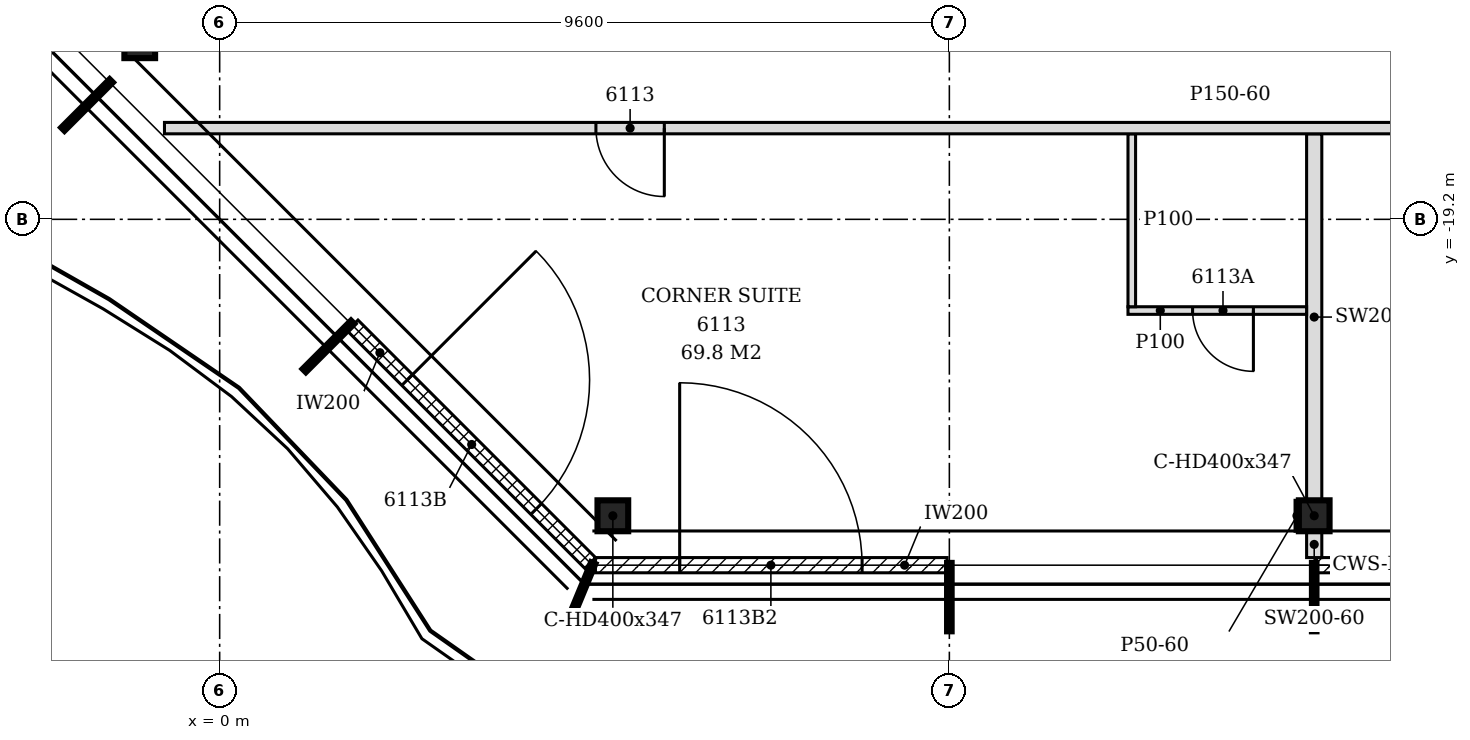
"""IFC4 building model, lengths in metres.
Left out: names, types, materials, properties, quantities, classifications, styles, units other than length and angle.
Written with IfcOpenShell. Run it as: python <this file> out.ifc"""

import sys

from ifc_helpers import new_model, si_unit, direction, frame, frame_2d, origin, origin_2d, place, context, subcontext, project, spatial, polyline, rectangle, i_section, outline, extrude, element, fill, save


model = new_model("IFC4")
c1 = context("Model", 3, precision=1e-05, world=origin(), true_north=direction((0.0, 1.0)))
c2 = subcontext(c1, "Body", "Model", "MODEL_VIEW")
j1 = project(units=[si_unit("LENGTHUNIT", "METRE"), si_unit("PLANEANGLEUNIT", "RADIAN")], contexts=[c1])
p1 = place(None, origin())
s1 = spatial("IfcSite", under=j1, at=p1, CompositionType="ELEMENT")
p2 = place(p1, origin())
s2 = spatial("IfcBuilding", under=s1, at=p2, CompositionType="ELEMENT")
p3 = place(p2, frame((0.0, 0.0, 239.4)))
s3 = spatial("IfcBuildingStorey", under=s2, at=p3, CompositionType="ELEMENT", Elevation=239.4)
for number, where, z_axis, x_axis in (
    (1, (5.173, -23.1, -0.15), (0.0, 0.0, 1.0), (1.0, 0.0, 0.0)),
    (2, (14.4, -23.1, -0.15), (0.0, 0.0, 1.0), (1.0, 0.0, 0.0)),
    (3, (-1.052, -16.876, -0.15), (0.0, 0.0, 1.0), (1.0, 0.0, 0.0)),
):
    element("IfcColumn", number, at=place(p3, frame(where, z_axis=z_axis, x_axis=x_axis)), inside=s3, PredefinedType="COLUMN", context=c2, shape_type="SweptSolid", body=[
        extrude(i_section(OverallWidth=0.404, OverallDepth=0.407, WebThickness=0.027, FlangeThickness=0.044, FilletRadius=0.015, at=origin_2d()), origin(), (0.0, 0.0, 1.0), 3.6),
    ])
p4 = place(p3, frame((4.944, -23.75, 0.0), z_axis=(0.0, 0.0, 1.0), x_axis=(1.0, 0.0, 0.0)))
e4 = element("IfcWall", 4, at=p4, inside=s3, PredefinedType="NOTDEFINED", context=c2, shape_type="SweptSolid", body=[
    extrude(rectangle(XDim=4.626, YDim=0.2, at=frame_2d((2.313, 0.0))), origin(), (0.0, 0.0, 1.0), 3.45),
])
p5 = place(p4, frame((1.108, 0.0, 0.0)))
e5 = element("IfcOpeningElement", 5, at=p5, cuts=e4, PredefinedType="OPENING", context=c2, shape_type="SweptSolid", body=[
    extrude(rectangle(XDim=2.4, YDim=2.4, at=frame_2d((1.2, 1.2))), frame((0.0, 0.11, 0.0), z_axis=(0.0, -1.0, 0.0), x_axis=(1.0, 0.0, 0.0)), (0.0, 0.0, 1.0), 0.22),
])
p6 = place(p3, frame((14.43, -23.75, 0.0), z_axis=(0.0, 0.0, 1.0), x_axis=(1.0, 0.0, 0.0)))
e6 = element("IfcWall", 6, at=p6, inside=s3, PredefinedType="NOTDEFINED", context=c2, shape_type="SweptSolid", body=[
    extrude(rectangle(XDim=4.74, YDim=0.2, at=frame_2d((2.37, 0.0))), origin(), (0.0, 0.0, 1.0), 3.45),
])
p7 = place(p6, frame((1.17, 0.0, 0.0)))
e7 = element("IfcOpeningElement", 7, at=p7, cuts=e6, PredefinedType="OPENING", context=c2, shape_type="SweptSolid", body=[
    extrude(rectangle(XDim=2.4, YDim=2.4, at=frame_2d((1.2, 1.2))), frame((0.0, 0.11, 0.0), z_axis=(0.0, -1.0, 0.0), x_axis=(1.0, 0.0, 0.0)), (0.0, 0.0, 1.0), 0.22),
])
p8 = place(p3, frame((1.749, -20.596, 0.0), z_axis=(0.0, 0.0, 1.0), x_axis=(0.707106781187, -0.707106781187, 0.0)))
e8 = element("IfcWall", 8, at=p8, inside=s3, PredefinedType="NOTDEFINED", context=c2, shape_type="SweptSolid", body=[
    extrude(rectangle(XDim=4.421, YDim=0.2, at=frame_2d((2.21, 0.0))), origin(), (0.0, 0.0, 1.0), 3.45),
])
p9 = place(p8, frame((1.015, 0.0, 0.0)))
e9 = element("IfcOpeningElement", 9, at=p9, cuts=e8, PredefinedType="OPENING", context=c2, shape_type="SweptSolid", body=[
    extrude(rectangle(XDim=2.4, YDim=2.4, at=frame_2d((1.2, 1.2))), frame((0.0, 0.11, 0.0), z_axis=(0.0, -1.0, 0.0), x_axis=(1.0, 0.0, 0.0)), (0.0, 0.0, 1.0), 0.22),
])
p10 = place(p3, frame((14.4, -23.65, 0.0), z_axis=(0.0, 0.0, 1.0), x_axis=(0.0, 1.0, 0.0)))
e10 = element("IfcWall", 10, at=p10, inside=s3, PredefinedType="PARTITIONING", context=c2, shape_type="SweptSolid", body=[
    extrude(rectangle(XDim=0.346, YDim=0.2, at=frame_2d((0.173, 0.0))), origin(), (0.0, 0.0, 1.0), 3.45),
])
p11 = place(p3, frame((14.4, -22.896, 0.0), z_axis=(0.0, 0.0, 1.0), x_axis=(0.0, 1.0, 0.0)))
e11 = element("IfcWall", 11, at=p11, inside=s3, PredefinedType="PARTITIONING", context=c2, shape_type="SweptSolid", body=[
    extrude(outline(polyline([(0.0, 0.0), (4.822, 0.0), (4.822, 3.45), (3.802, 3.45), (3.8, 2.88), (3.592, 2.88), (3.59, 3.45), (0.0, 3.45), (0.0, 0.0)])), frame((0.0, 0.1, 0.0), z_axis=(0.0, -1.0, 0.0), x_axis=(1.0, 0.0, 0.0)), (0.0, 0.0, 1.0), 0.2),
])
p12 = place(p3, frame((11.95, -20.4, 0.0), z_axis=(0.0, 0.0, 1.0), x_axis=(1.0, 0.0, 0.0)))
e12 = element("IfcWall", 12, at=p12, inside=s3, PredefinedType="PARTITIONING", context=c2, shape_type="SweptSolid", body=[
    extrude(rectangle(XDim=2.35, YDim=0.1, at=frame_2d((1.175, 0.0))), origin(), (0.0, 0.0, 1.0), 3.45),
])
p13 = place(p12, frame((0.85, 0.0, 0.0)))
e13 = element("IfcOpeningElement", 13, at=p13, cuts=e12, PredefinedType="OPENING", context=c2, shape_type="SweptSolid", body=[
    extrude(rectangle(XDim=0.8, YDim=2.1, at=frame_2d((0.4, 1.05))), frame((0.0, 0.06, 0.0), z_axis=(0.0, -1.0, 0.0), x_axis=(1.0, 0.0, 0.0)), (0.0, 0.0, 1.0), 0.12),
])
p14 = place(p3, frame((12.0, -20.35, 0.0), z_axis=(0.0, 0.0, 1.0), x_axis=(0.0, 1.0, 0.0)))
e14 = element("IfcWall", 14, at=p14, inside=s3, PredefinedType="PARTITIONING", context=c2, shape_type="SweptSolid", body=[
    extrude(outline(polyline([(0.0, 0.0), (2.275, 0.0), (2.275, 3.45), (1.255, 3.45), (1.253, 2.88), (1.045, 2.88), (1.043, 3.45), (0.0, 3.45), (0.0, 0.0)])), frame((0.0, 0.05, 0.0), z_axis=(0.0, -1.0, 0.0), x_axis=(1.0, 0.0, 0.0)), (0.0, 0.0, 1.0), 0.1),
])
p15 = place(p3, frame((-0.726, -18.0, 0.0), z_axis=(0.0, 0.0, 1.0), x_axis=(1.0, 0.0, 0.0)))
e15 = element("IfcWall", 15, at=p15, inside=s3, PredefinedType="PARTITIONING", context=c2, shape_type="SweptSolid", body=[
    extrude(outline(polyline([(0.0, 0.0), (22.347, 0.0), (22.347, 3.45), (20.076, 3.45), (20.074, 2.73), (19.776, 2.73), (19.774, 3.45), (8.076, 3.45), (8.074, 2.73), (7.776, 2.73), (7.774, 3.45), (1.086, 3.45), (1.084, 2.93), (0.512, 2.93), (0.51, 3.45), (0.0, 3.45), (0.0, 0.0)])), frame((0.0, 0.075, 0.0), z_axis=(0.0, -1.0, 0.0), x_axis=(1.0, 0.0, 0.0)), (0.0, 0.0, 1.0), 0.15),
])
p16 = place(p15, frame((5.676, 0.0, 0.0)))
e16 = element("IfcOpeningElement", 16, at=p16, cuts=e15, PredefinedType="OPENING", context=c2, shape_type="SweptSolid", body=[
    extrude(rectangle(XDim=0.9, YDim=2.1, at=frame_2d((0.45, 1.05))), frame((0.0, 0.085, 0.0), z_axis=(0.0, -1.0, 0.0), x_axis=(1.0, 0.0, 0.0)), (0.0, 0.0, 1.0), 0.17),
])
p17 = place(p3, frame((14.173, -23.303, 0.0), z_axis=(0.0, 0.0, 1.0), x_axis=(0.0, 1.0, 0.0)))
e17 = element("IfcWall", 17, at=p17, inside=s3, PredefinedType="PARTITIONING", context=c2, shape_type="SweptSolid", body=[
    extrude(rectangle(XDim=0.407, YDim=0.05, at=frame_2d((0.204, 0.0))), origin(), (0.0, 0.0, 1.0), 2.93),
])
p18 = place(p5, origin())
e18 = element("IfcDoor", 18, at=p18, inside=s3, OperationType="SINGLE_SWING_LEFT", PredefinedType="DOOR", context=c2, shape_type="SweptSolid", body=[
    extrude(rectangle(XDim=2.4, YDim=2.4, at=frame_2d((1.2, 1.2))), frame((0.0, 0.025, 0.0), z_axis=(0.0, -1.0, 0.0), x_axis=(1.0, 0.0, 0.0)), (0.0, 0.0, 1.0), 0.05),
])
fill(e5, e18)
p19 = place(p9, origin())
e19 = element("IfcDoor", 19, at=p19, inside=s3, OperationType="SINGLE_SWING_LEFT", PredefinedType="DOOR", context=c2, shape_type="SweptSolid", body=[
    extrude(rectangle(XDim=2.4, YDim=2.4, at=frame_2d((1.2, 1.2))), frame((0.0, 0.025, 0.0), z_axis=(0.0, -1.0, 0.0), x_axis=(1.0, 0.0, 0.0)), (0.0, 0.0, 1.0), 0.05),
])
fill(e9, e19)
p20 = place(p16, frame((0.9, 0.0, 0.0), z_axis=(0.0, 0.0, 1.0), x_axis=(-1.0, 0.0, 0.0)))
e20 = element("IfcDoor", 20, at=p20, inside=s3, OperationType="SINGLE_SWING_LEFT", PredefinedType="DOOR", context=c2, shape_type="SweptSolid", body=[
    extrude(rectangle(XDim=0.9, YDim=2.1, at=frame_2d((0.45, 1.05))), frame((0.0, 0.025, 0.0), z_axis=(0.0, -1.0, 0.0), x_axis=(1.0, 0.0, 0.0)), (0.0, 0.0, 1.0), 0.05),
])
fill(e16, e20)
p21 = place(p13, frame((0.8, 0.0, 0.0), z_axis=(0.0, 0.0, 1.0), x_axis=(-1.0, 0.0, 0.0)))
e21 = element("IfcDoor", 21, at=p21, inside=s3, OperationType="SINGLE_SWING_LEFT", PredefinedType="DOOR", context=c2, shape_type="SweptSolid", body=[
    extrude(rectangle(XDim=0.8, YDim=2.1, at=frame_2d((0.4, 1.05))), frame((0.0, 0.025, 0.0), z_axis=(0.0, -1.0, 0.0), x_axis=(1.0, 0.0, 0.0)), (0.0, 0.0, 1.0), 0.05),
])
fill(e13, e21)
save(model, sys.argv[1])
